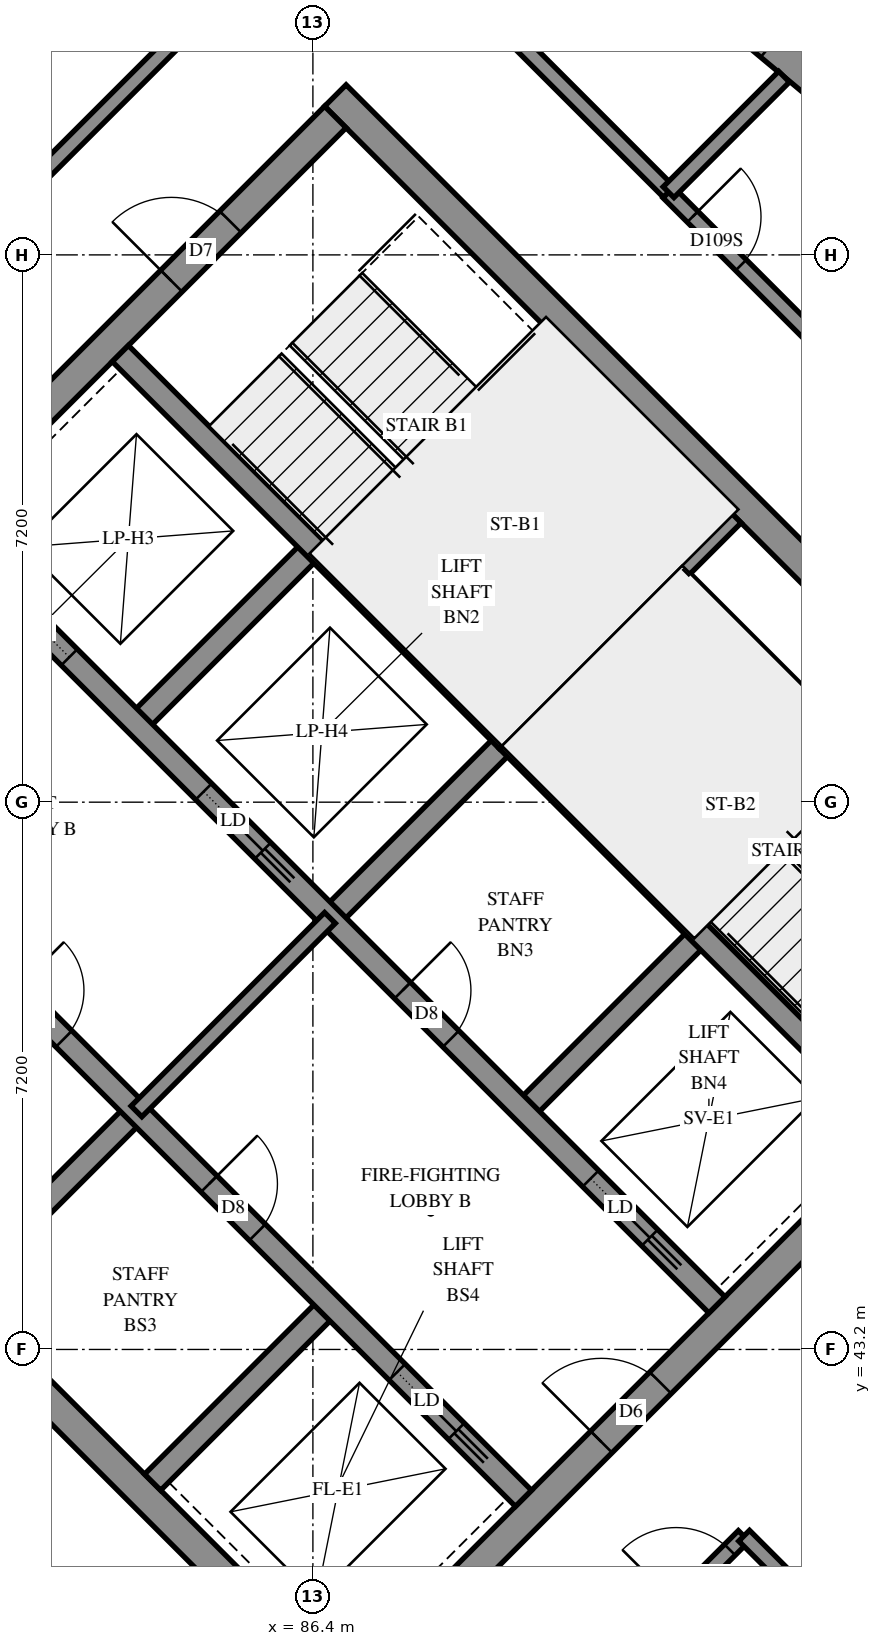
"""IFC4 building model, lengths in metres.
Left out: names, types, materials, properties, quantities, classifications, styles, units other than length and angle.
Written with IfcOpenShell. Run it as: python <this file> out.ifc"""

import sys

from ifc_helpers import new_model, si_unit, direction, frame, frame_2d, origin, place, context, subcontext, project, spatial, polyline, rectangle, outline, extrude, element, fill, save


model = new_model("IFC4")
c1 = context("Model", 3, precision=1e-05, world=origin(), true_north=direction((0.0, 1.0)))
c2 = subcontext(c1, "Body", "Model", "MODEL_VIEW")
j1 = project(units=[si_unit("LENGTHUNIT", "METRE"), si_unit("PLANEANGLEUNIT", "RADIAN")], contexts=[c1])
p1 = place(None, origin())
s1 = spatial("IfcSite", under=j1, at=p1, CompositionType="ELEMENT")
p2 = place(p1, origin())
s2 = spatial("IfcBuilding", under=s1, at=p2, CompositionType="ELEMENT")
p3 = place(p2, frame((0.0, 0.0, 243.8)))
s3 = spatial("IfcBuildingStorey", under=s2, at=p3, CompositionType="ELEMENT", Elevation=243.8)
p4 = place(p3, frame((76.23, 49.231, -0.3), z_axis=(0.0, 0.0, 1.0), x_axis=(0.7071034917, -0.7071100706, 0.0)))
e1 = element("IfcWall", 1, at=p4, inside=s3, PredefinedType="SHEAR", context=c2, shape_type="SweptSolid", body=[
    extrude(rectangle(XDim=15.2, YDim=0.4, at=frame_2d((7.6, 0.0))), origin(), (0.0, 0.0, 1.0), 2.7),
])
p5 = place(p3, frame((86.695, 59.696, -0.3), z_axis=(0.0, 0.0, 1.0), x_axis=(0.7071100706, -0.7071034917, 0.0)))
e2 = element("IfcWall", 2, at=p5, inside=s3, PredefinedType="SHEAR", context=c2, shape_type="SweptSolid", body=[
    extrude(rectangle(XDim=15.2, YDim=0.4, at=frame_2d((7.6, 0.0))), origin(), (0.0, 0.0, 1.0), 2.7),
])
p6 = place(p5, frame((10.4, 0.0, 0.3)))
e3 = element("IfcOpeningElement", 3, at=p6, cuts=e2, PredefinedType="OPENING", context=c2, shape_type="SweptSolid", body=[
    extrude(rectangle(XDim=0.8, YDim=2.1, at=frame_2d((0.4, 1.05))), frame((0.0, 0.21, 0.0), z_axis=(0.0, -1.0, 0.0), x_axis=(1.0, 0.0, 0.0)), (0.0, 0.0, 1.0), 0.42),
])
p7 = place(p3, frame((76.513, 49.231, -0.3), z_axis=(0.0, 0.0, 1.0), x_axis=(0.7071067812, 0.7071067812, 0.0)))
e4 = element("IfcWall", 4, at=p7, inside=s3, PredefinedType="SHEAR", context=c2, shape_type="SweptSolid", body=[
    extrude(rectangle(XDim=14.4, YDim=0.4, at=frame_2d((7.2, 0.0))), origin(), (0.0, 0.0, 1.0), 2.7),
])
p8 = place(p7, frame((4.55, 0.0, 0.3)))
e5 = element("IfcOpeningElement", 5, at=p8, cuts=e4, PredefinedType="OPENING", context=c2, shape_type="SweptSolid", body=[
    extrude(rectangle(XDim=1.1, YDim=2.1, at=frame_2d((0.55, 1.05))), frame((0.0, 0.21, 0.0), z_axis=(0.0, -1.0, 0.0), x_axis=(1.0, 0.0, 0.0)), (0.0, 0.0, 1.0), 0.42),
])
p9 = place(p7, frame((11.35, 0.0, 0.3)))
e6 = element("IfcOpeningElement", 6, at=p9, cuts=e4, PredefinedType="OPENING", context=c2, shape_type="SweptSolid", body=[
    extrude(rectangle(XDim=1.1, YDim=2.1, at=frame_2d((0.55, 1.05))), frame((0.0, 0.21, 0.0), z_axis=(0.0, -1.0, 0.0), x_axis=(1.0, 0.0, 0.0)), (0.0, 0.0, 1.0), 0.42),
])
p10 = place(p3, frame((86.978, 38.766, -0.3), z_axis=(0.0, 0.0, 1.0), x_axis=(0.7071067812, 0.7071067812, 0.0)))
e7 = element("IfcWall", 7, at=p10, inside=s3, PredefinedType="SHEAR", context=c2, shape_type="SweptSolid", body=[
    extrude(rectangle(XDim=14.4, YDim=0.4, at=frame_2d((7.2, 0.0))), origin(), (0.0, 0.0, 1.0), 2.7),
])
p11 = place(p10, frame((4.55, 0.0, 0.3)))
e8 = element("IfcOpeningElement", 8, at=p11, cuts=e7, PredefinedType="OPENING", context=c2, shape_type="SweptSolid", body=[
    extrude(rectangle(XDim=1.1, YDim=2.1, at=frame_2d((0.55, 1.05))), frame((0.0, 0.21, 0.0), z_axis=(0.0, -1.0, 0.0), x_axis=(1.0, 0.0, 0.0)), (0.0, 0.0, 1.0), 0.42),
])
p12 = place(p10, frame((11.35, 0.0, 0.3)))
e9 = element("IfcOpeningElement", 9, at=p12, cuts=e7, PredefinedType="OPENING", context=c2, shape_type="SweptSolid", body=[
    extrude(rectangle(XDim=1.1, YDim=2.1, at=frame_2d((0.55, 1.05))), frame((0.0, 0.21, 0.0), z_axis=(0.0, -1.0, 0.0), x_axis=(1.0, 0.0, 0.0)), (0.0, 0.0, 1.0), 0.42),
])
p13 = place(p3, frame((84.079, 51.423, 0.0), z_axis=(0.0, 0.0, 1.0), x_axis=(0.7071219326, 0.7070916295, 0.0)))
e10 = element("IfcWall", 10, at=p13, inside=s3, PredefinedType="SOLIDWALL", context=c2, shape_type="SweptSolid", body=[
    extrude(rectangle(XDim=3.3, YDim=0.3, at=frame_2d((1.65, 0.0))), origin(), (0.0, 0.0, 1.0), 3.1),
])
p14 = place(p3, frame((81.746, 43.999, 0.0), z_axis=(0.0, 0.0, 1.0), x_axis=(0.7071067812, 0.7071067812, 0.0)))
e11 = element("IfcWall", 11, at=p14, inside=s3, PredefinedType="SOLIDWALL", context=c2, shape_type="SweptSolid", body=[
    extrude(rectangle(XDim=3.3, YDim=0.3, at=frame_2d((1.65, 0.0))), origin(), (0.0, 0.0, 1.0), 3.1),
])
p15 = place(p3, frame((86.625, 48.878, 0.0), z_axis=(0.0, 0.0, 1.0), x_axis=(0.7071067812, 0.7071067812, 0.0)))
e12 = element("IfcWall", 12, at=p15, inside=s3, PredefinedType="SOLIDWALL", context=c2, shape_type="SweptSolid", body=[
    extrude(rectangle(XDim=3.3, YDim=0.3, at=frame_2d((1.65, 0.0))), origin(), (0.0, 0.0, 1.0), 3.1),
])
p16 = place(p3, frame((84.291, 41.453, 0.0), z_axis=(0.0, 0.0, 1.0), x_axis=(0.7071067812, 0.7071067812, 0.0)))
e13 = element("IfcWall", 13, at=p16, inside=s3, PredefinedType="SOLIDWALL", context=c2, shape_type="SweptSolid", body=[
    extrude(rectangle(XDim=3.3, YDim=0.3, at=frame_2d((1.65, 0.0))), origin(), (0.0, 0.0, 1.0), 3.1),
])
p17 = place(p3, frame((89.17, 46.332, 0.0), z_axis=(0.0, 0.0, 1.0), x_axis=(0.7071067812, 0.7071067812, 0.0)))
e14 = element("IfcWall", 14, at=p17, inside=s3, PredefinedType="SOLIDWALL", context=c2, shape_type="SweptSolid", body=[
    extrude(rectangle(XDim=3.3, YDim=0.3, at=frame_2d((1.65, 0.0))), origin(), (0.0, 0.0, 1.0), 3.1),
])
p18 = place(p3, frame((78.988, 51.423, 0.0), z_axis=(0.0, 0.0, 1.0), x_axis=(0.7071067812, -0.7071067812, 0.0)))
e15 = element("IfcWall", 15, at=p18, inside=s3, PredefinedType="SOLIDWALL", context=c2, shape_type="SweptSolid", body=[
    extrude(rectangle(XDim=14.4, YDim=0.3, at=frame_2d((7.2, 0.0))), origin(), (0.0, 0.0, 1.0), 3.1),
])
p19 = place(p18, frame((1.35, 0.0, 0.0)))
e16 = element("IfcOpeningElement", 16, at=p19, cuts=e15, PredefinedType="OPENING", context=c2, shape_type="SweptSolid", body=[
    extrude(rectangle(XDim=0.9, YDim=2.1, at=frame_2d((0.45, 1.05))), frame((0.0, 0.16, 0.0), z_axis=(0.0, -1.0, 0.0), x_axis=(1.0, 0.0, 0.0)), (0.0, 0.0, 1.0), 0.32),
])
p20 = place(p18, frame((4.95, 0.0, 0.0)))
e17 = element("IfcOpeningElement", 17, at=p20, cuts=e15, PredefinedType="OPENING", context=c2, shape_type="SweptSolid", body=[
    extrude(rectangle(XDim=0.9, YDim=2.1, at=frame_2d((0.45, 1.05))), frame((0.0, 0.16, 0.0), z_axis=(0.0, -1.0, 0.0), x_axis=(1.0, 0.0, 0.0)), (0.0, 0.0, 1.0), 0.32),
])
p21 = place(p18, frame((8.55, 0.0, 0.0)))
e18 = element("IfcOpeningElement", 18, at=p21, cuts=e15, PredefinedType="OPENING", context=c2, shape_type="SweptSolid", body=[
    extrude(rectangle(XDim=0.9, YDim=2.1, at=frame_2d((0.45, 1.05))), frame((0.0, 0.16, 0.0), z_axis=(0.0, -1.0, 0.0), x_axis=(1.0, 0.0, 0.0)), (0.0, 0.0, 1.0), 0.32),
])
p22 = place(p18, frame((12.05, 0.0, 0.0)))
e19 = element("IfcOpeningElement", 19, at=p22, cuts=e15, PredefinedType="OPENING", context=c2, shape_type="SweptSolid", body=[
    extrude(rectangle(XDim=1.1, YDim=2.1, at=frame_2d((0.55, 1.05))), frame((0.0, 0.16, 0.0), z_axis=(0.0, -1.0, 0.0), x_axis=(1.0, 0.0, 0.0)), (0.0, 0.0, 1.0), 0.32),
])
p23 = place(p3, frame((81.534, 53.969, 0.0), z_axis=(0.0, 0.0, 1.0), x_axis=(0.707103309, -0.7071102534, 0.0)))
e20 = element("IfcWall", 20, at=p23, inside=s3, PredefinedType="SOLIDWALL", context=c2, shape_type="SweptSolid", body=[
    extrude(rectangle(XDim=14.4, YDim=0.3, at=frame_2d((7.2, 0.0))), origin(), (0.0, 0.0, 1.0), 3.1),
])
p24 = place(p23, frame((8.55, 0.0, 0.0)))
e21 = element("IfcOpeningElement", 21, at=p24, cuts=e20, PredefinedType="OPENING", context=c2, shape_type="SweptSolid", body=[
    extrude(rectangle(XDim=0.9, YDim=2.1, at=frame_2d((0.45, 1.05))), frame((0.0, 0.16, 0.0), z_axis=(0.0, -1.0, 0.0), x_axis=(1.0, 0.0, 0.0)), (0.0, 0.0, 1.0), 0.32),
])
p25 = place(p23, frame((1.25, 0.0, 0.0)))
e22 = element("IfcOpeningElement", 22, at=p25, cuts=e20, PredefinedType="OPENING", context=c2, shape_type="SweptSolid", body=[
    extrude(rectangle(XDim=1.1, YDim=2.1, at=frame_2d((0.55, 1.05))), frame((0.0, 0.16, 0.0), z_axis=(0.0, -1.0, 0.0), x_axis=(1.0, 0.0, 0.0)), (0.0, 0.0, 1.0), 0.32),
])
p26 = place(p23, frame((4.85, 0.0, 0.0)))
e23 = element("IfcOpeningElement", 23, at=p26, cuts=e20, PredefinedType="OPENING", context=c2, shape_type="SweptSolid", body=[
    extrude(rectangle(XDim=1.1, YDim=2.1, at=frame_2d((0.55, 1.05))), frame((0.0, 0.16, 0.0), z_axis=(0.0, -1.0, 0.0), x_axis=(1.0, 0.0, 0.0)), (0.0, 0.0, 1.0), 0.32),
])
p27 = place(p23, frame((12.05, 0.0, 0.0)))
e24 = element("IfcOpeningElement", 24, at=p27, cuts=e20, PredefinedType="OPENING", context=c2, shape_type="SweptSolid", body=[
    extrude(rectangle(XDim=1.1, YDim=2.1, at=frame_2d((0.55, 1.05))), frame((0.0, 0.16, 0.0), z_axis=(0.0, -1.0, 0.0), x_axis=(1.0, 0.0, 0.0)), (0.0, 0.0, 1.0), 0.32),
])
for number, where, z_axis, x_axis in (
    (25, (83.867, 56.302, 0.0), (0.0, 0.0, 1.0), (0.707, -0.707, 0.0)),
    (26, (88.958, 51.211, 0.0), (0.0, 0.0, 1.0), (0.707, -0.707, 0.0)),
):
    element("IfcWall", number, at=place(p3, frame(where, z_axis=z_axis, x_axis=x_axis)), inside=s3, PredefinedType="SOLIDWALL", context=c2, shape_type="SweptSolid", body=[
        extrude(rectangle(XDim=7.2, YDim=0.3, at=frame_2d((3.6, 0.0))), origin(), (0.0, 0.0, 1.0), 3.1),
    ])
p28 = place(p3, frame((88.958, 51.211, 0.0), z_axis=(0.0, 0.0, 1.0), x_axis=(0.7071067812, 0.7071067812, 0.0)))
e27 = element("IfcWall", 27, at=p28, inside=s3, PredefinedType="SOLIDWALL", context=c2, shape_type="SweptSolid", body=[
    extrude(rectangle(XDim=4.2, YDim=0.3, at=frame_2d((2.1, 0.0))), origin(), (0.0, 0.0, 1.0), 3.1),
])
p29 = place(p3, frame((93.601, 59.401, 0.0), z_axis=(0.0, 0.0, 1.0), x_axis=(-0.7677573222, 0.6407407387, 0.0)))
e28 = element("IfcWall", 28, at=p29, inside=s3, PredefinedType="SOLIDWALL", context=c2, shape_type="SweptSolid", body=[
    extrude(outline(polyline([(-0.02, -0.225), (3.32, -0.225), (3.361, 0.225), (0.02, 0.225), (-0.02, -0.225)])), origin(), (0.0, 0.0, 1.0), 3.1),
])
p30 = place(p29, frame((1.518, 0.0, 0.45)))
e29 = element("IfcOpeningElement", 29, at=p30, cuts=e28, PredefinedType="OPENING", context=c2, shape_type="SweptSolid", body=[
    extrude(rectangle(XDim=1.2, YDim=2.55, at=frame_2d((0.6, 1.275))), frame((0.0, 0.235, 0.0), z_axis=(0.0, -1.0, 0.0), x_axis=(1.0, 0.0, 0.0)), (0.0, 0.0, 1.0), 0.47),
])
p31 = place(p3, frame((91.313, 53.354, 0.0), z_axis=(0.0, 0.0, 1.0), x_axis=(0.7071067812, -0.7071067812, 0.0)))
e30 = element("IfcWall", 30, at=p31, inside=s3, PredefinedType="PARTITIONING", context=c2, shape_type="SweptSolid", body=[
    extrude(rectangle(XDim=5.65, YDim=0.15, at=frame_2d((2.825, 0.0))), origin(), (0.0, 0.0, 1.0), 3.1),
])
p32 = place(p3, frame((84.079, 46.332, 0.0), z_axis=(0.0, 0.0, 1.0), x_axis=(0.7071067812, 0.7071067812, 0.0)))
e31 = element("IfcWall", 31, at=p32, inside=s3, PredefinedType="PARTITIONING", context=c2, shape_type="SweptSolid", body=[
    extrude(rectangle(XDim=3.6, YDim=0.2, at=frame_2d((1.8, 0.0))), origin(), (0.0, 0.0, 1.0), 3.1),
])
p33 = place(p3, frame((79.907, 55.739, 0.0), z_axis=(0.0, 0.0, 1.0), x_axis=(0.7071067812, 0.7071067812, 0.0)))
e32 = element("IfcWall", 32, at=p33, inside=s3, PredefinedType="PARTITIONING", context=c2, shape_type="SweptSolid", body=[
    extrude(rectangle(XDim=9.798, YDim=0.2, at=frame_2d((4.899, 0.0))), origin(), (0.0, 0.0, 1.0), 3.1),
])
p34 = place(p33, frame((0.616, 0.0, 0.0)))
e33 = element("IfcOpeningElement", 33, at=p34, cuts=e32, PredefinedType="OPENING", context=c2, shape_type="SweptSolid", body=[
    extrude(rectangle(XDim=1.0, YDim=2.1, at=frame_2d((0.5, 1.05))), frame((0.0, 0.11, 0.0), z_axis=(0.0, -1.0, 0.0), x_axis=(1.0, 0.0, 0.0)), (0.0, 0.0, 1.0), 0.22),
])
p35 = place(p3, frame((80.747, 41.597, 0.0), z_axis=(0.0, 0.0, 1.0), x_axis=(0.7071067812, -0.7071067812, 0.0)))
e34 = element("IfcWall", 34, at=p35, inside=s3, PredefinedType="PARTITIONING", context=c2, shape_type="SweptSolid", body=[
    extrude(rectangle(XDim=8.607, YDim=0.2, at=frame_2d((4.303, 0.0))), origin(), (0.0, 0.0, 1.0), 3.1),
])
p36 = place(p35, frame((2.903, 0.0, 0.0)))
e35 = element("IfcOpeningElement", 35, at=p36, cuts=e34, PredefinedType="OPENING", context=c2, shape_type="SweptSolid", body=[
    extrude(rectangle(XDim=1.0, YDim=2.1, at=frame_2d((0.5, 1.05))), frame((0.0, 0.11, 0.0), z_axis=(0.0, -1.0, 0.0), x_axis=(1.0, 0.0, 0.0)), (0.0, 0.0, 1.0), 0.22),
])
p37 = place(p3, frame((86.836, 35.514, 0.0), z_axis=(0.0, 0.0, 1.0), x_axis=(0.7071067812, 0.7071067812, 0.0)))
e36 = element("IfcWall", 36, at=p37, inside=s3, PredefinedType="PARTITIONING", context=c2, shape_type="SweptSolid", body=[
    extrude(rectangle(XDim=7.399, YDim=0.2, at=frame_2d((3.7, 0.0))), origin(), (0.0, 0.0, 1.0), 3.1),
])
p38 = place(p37, frame((6.142, 0.0, 0.0)))
e37 = element("IfcOpeningElement", 37, at=p38, cuts=e36, PredefinedType="OPENING", context=c2, shape_type="SweptSolid", body=[
    extrude(rectangle(XDim=1.0, YDim=2.1, at=frame_2d((0.5, 1.05))), frame((0.0, 0.11, 0.0), z_axis=(0.0, -1.0, 0.0), x_axis=(1.0, 0.0, 0.0)), (0.0, 0.0, 1.0), 0.22),
])
p39 = place(p3, frame((86.841, 62.669, 0.0), z_axis=(0.0, 0.0, 1.0), x_axis=(0.7071067812, -0.7071067812, 0.0)))
e38 = element("IfcWall", 38, at=p39, inside=s3, PredefinedType="PARTITIONING", context=c2, shape_type="SweptSolid", body=[
    extrude(rectangle(XDim=5.999, YDim=0.2, at=frame_2d((3.0, 0.0))), origin(), (0.0, 0.0, 1.0), 3.1),
])
p40 = place(p3, frame((92.073, 40.749, 0.0), z_axis=(0.0, 0.0, 1.0), x_axis=(0.7071067812, -0.7071067812, 0.0)))
e39 = element("IfcWall", 39, at=p40, inside=s3, PredefinedType="PARTITIONING", context=c2, shape_type="SweptSolid", body=[
    extrude(rectangle(XDim=4.8, YDim=0.2, at=frame_2d((2.4, 0.0))), origin(), (0.0, 0.0, 1.0), 3.1),
])
p41 = place(p40, frame((1.767, 0.0, 0.0)))
e40 = element("IfcOpeningElement", 40, at=p41, cuts=e39, PredefinedType="OPENING", context=c2, shape_type="SweptSolid", body=[
    extrude(rectangle(XDim=1.0, YDim=2.1, at=frame_2d((0.5, 1.05))), frame((0.0, 0.11, 0.0), z_axis=(0.0, -1.0, 0.0), x_axis=(1.0, 0.0, 0.0)), (0.0, 0.0, 1.0), 0.22),
])
p42 = place(p3, frame((91.077, 58.421, 0.0), z_axis=(0.0, 0.0, 1.0), x_axis=(0.7068288851, -0.7073845681, 0.0)))
e41 = element("IfcWall", 41, at=p42, inside=s3, PredefinedType="PARTITIONING", context=c2, shape_type="SweptSolid", body=[
    extrude(rectangle(XDim=3.599, YDim=0.2, at=frame_2d((1.8, 0.0))), origin(), (0.0, 0.0, 1.0), 3.1),
])
p43 = place(p42, frame((0.451, 0.0, 0.0)))
e42 = element("IfcOpeningElement", 42, at=p43, cuts=e41, PredefinedType="OPENING", context=c2, shape_type="SweptSolid", body=[
    extrude(rectangle(XDim=0.9, YDim=2.1, at=frame_2d((0.45, 1.05))), frame((0.0, 0.11, 0.0), z_axis=(0.0, -1.0, 0.0), x_axis=(1.0, 0.0, 0.0)), (0.0, 0.0, 1.0), 0.22),
])
p44 = place(p3, frame((91.079, 58.425, 0.0), z_axis=(0.0, 0.0, 1.0), x_axis=(0.7071067812, 0.7071067812, 0.0)))
e43 = element("IfcWall", 43, at=p44, inside=s3, PredefinedType="PARTITIONING", context=c2, shape_type="SweptSolid", body=[
    extrude(rectangle(XDim=2.149, YDim=0.2, at=frame_2d((1.074, 0.0))), origin(), (0.0, 0.0, 1.0), 3.1),
])
p45 = place(p30, origin())
e44 = element("IfcWindow", 44, at=p45, inside=s3, PartitioningType="SINGLE_PANEL", PredefinedType="WINDOW", context=c2, shape_type="SweptSolid", body=[
    extrude(rectangle(XDim=1.2, YDim=2.55, at=frame_2d((0.6, 1.275))), frame((0.0, 0.205, 0.0), z_axis=(0.0, -1.0, 0.0), x_axis=(1.0, 0.0, 0.0)), (0.0, 0.0, 1.0), 0.06),
])
fill(e29, e44)
p46 = place(p11, origin())
e45 = element("IfcDoor", 45, at=p46, inside=s3, OperationType="DOUBLE_DOOR_SINGLE_SWING", PredefinedType="DOOR", context=c2, shape_type="SweptSolid", body=[
    extrude(rectangle(XDim=1.1, YDim=2.1, at=frame_2d((0.55, 1.05))), frame((0.0, 0.025, 0.0), z_axis=(0.0, -1.0, 0.0), x_axis=(1.0, 0.0, 0.0)), (0.0, 0.0, 1.0), 0.05),
])
fill(e8, e45)
p47 = place(p9, origin())
e46 = element("IfcDoor", 46, at=p47, inside=s3, OperationType="SINGLE_SWING_LEFT", PredefinedType="DOOR", context=c2, shape_type="SweptSolid", body=[
    extrude(rectangle(XDim=1.1, YDim=2.1, at=frame_2d((0.55, 1.05))), frame((0.0, 0.025, 0.0), z_axis=(0.0, -1.0, 0.0), x_axis=(1.0, 0.0, 0.0)), (0.0, 0.0, 1.0), 0.05),
])
fill(e6, e46)
p48 = place(p20, origin())
e47 = element("IfcDoor", 47, at=p48, inside=s3, OperationType="SINGLE_SWING_LEFT", PredefinedType="DOOR", context=c2, shape_type="SweptSolid", body=[
    extrude(rectangle(XDim=0.9, YDim=2.1, at=frame_2d((0.45, 1.05))), frame((0.0, 0.025, 0.0), z_axis=(0.0, -1.0, 0.0), x_axis=(1.0, 0.0, 0.0)), (0.0, 0.0, 1.0), 0.05),
])
fill(e17, e47)
p49 = place(p21, origin())
e48 = element("IfcDoor", 48, at=p49, inside=s3, OperationType="SINGLE_SWING_LEFT", PredefinedType="DOOR", context=c2, shape_type="SweptSolid", body=[
    extrude(rectangle(XDim=0.9, YDim=2.1, at=frame_2d((0.45, 1.05))), frame((0.0, 0.025, 0.0), z_axis=(0.0, -1.0, 0.0), x_axis=(1.0, 0.0, 0.0)), (0.0, 0.0, 1.0), 0.05),
])
fill(e18, e48)
p50 = place(p24, origin())
e49 = element("IfcDoor", 49, at=p50, inside=s3, OperationType="SINGLE_SWING_LEFT", PredefinedType="DOOR", context=c2, shape_type="SweptSolid", body=[
    extrude(rectangle(XDim=0.9, YDim=2.1, at=frame_2d((0.45, 1.05))), frame((0.0, 0.025, 0.0), z_axis=(0.0, -1.0, 0.0), x_axis=(1.0, 0.0, 0.0)), (0.0, 0.0, 1.0), 0.05),
])
fill(e21, e49)
p51 = place(p22, origin())
e50 = element("IfcDoor", 50, at=p51, inside=s3, OperationType="SLIDING_TO_RIGHT", PredefinedType="DOOR", context=c2, shape_type="SweptSolid", body=[
    extrude(rectangle(XDim=1.1, YDim=2.1, at=frame_2d((0.55, 1.05))), frame((0.0, 0.025, 0.0), z_axis=(0.0, -1.0, 0.0), x_axis=(1.0, 0.0, 0.0)), (0.0, 0.0, 1.0), 0.05),
])
fill(e19, e50)
p52 = place(p25, origin())
e51 = element("IfcDoor", 51, at=p52, inside=s3, OperationType="SLIDING_TO_LEFT", PredefinedType="DOOR", context=c2, shape_type="SweptSolid", body=[
    extrude(rectangle(XDim=1.1, YDim=2.1, at=frame_2d((0.55, 1.05))), frame((0.0, 0.025, 0.0), z_axis=(0.0, -1.0, 0.0), x_axis=(1.0, 0.0, 0.0)), (0.0, 0.0, 1.0), 0.05),
])
fill(e22, e51)
p53 = place(p26, origin())
e52 = element("IfcDoor", 52, at=p53, inside=s3, OperationType="SLIDING_TO_RIGHT", PredefinedType="DOOR", context=c2, shape_type="SweptSolid", body=[
    extrude(rectangle(XDim=1.1, YDim=2.1, at=frame_2d((0.55, 1.05))), frame((0.0, 0.025, 0.0), z_axis=(0.0, -1.0, 0.0), x_axis=(1.0, 0.0, 0.0)), (0.0, 0.0, 1.0), 0.05),
])
fill(e23, e52)
p54 = place(p27, origin())
e53 = element("IfcDoor", 53, at=p54, inside=s3, OperationType="SLIDING_TO_RIGHT", PredefinedType="DOOR", context=c2, shape_type="SweptSolid", body=[
    extrude(rectangle(XDim=1.1, YDim=2.1, at=frame_2d((0.55, 1.05))), frame((0.0, 0.025, 0.0), z_axis=(0.0, -1.0, 0.0), x_axis=(1.0, 0.0, 0.0)), (0.0, 0.0, 1.0), 0.05),
])
fill(e24, e53)
p55 = place(p43, origin())
e54 = element("IfcDoor", 54, at=p55, inside=s3, OperationType="SINGLE_SWING_RIGHT", PredefinedType="DOOR", context=c2, shape_type="SweptSolid", body=[
    extrude(rectangle(XDim=0.9, YDim=2.1, at=frame_2d((0.45, 1.05))), frame((0.0, 0.025, 0.0), z_axis=(0.0, -1.0, 0.0), x_axis=(1.0, 0.0, 0.0)), (0.0, 0.0, 1.0), 0.05),
])
fill(e42, e54)
p56 = place(p38, origin())
e55 = element("IfcDoor", 55, at=p56, inside=s3, OperationType="SINGLE_SWING_RIGHT", PredefinedType="DOOR", context=c2, shape_type="SweptSolid", body=[
    extrude(rectangle(XDim=1.0, YDim=2.1, at=frame_2d((0.5, 1.05))), frame((0.0, 0.025, 0.0), z_axis=(0.0, -1.0, 0.0), x_axis=(1.0, 0.0, 0.0)), (0.0, 0.0, 1.0), 0.05),
])
fill(e37, e55)
save(model, sys.argv[1])
